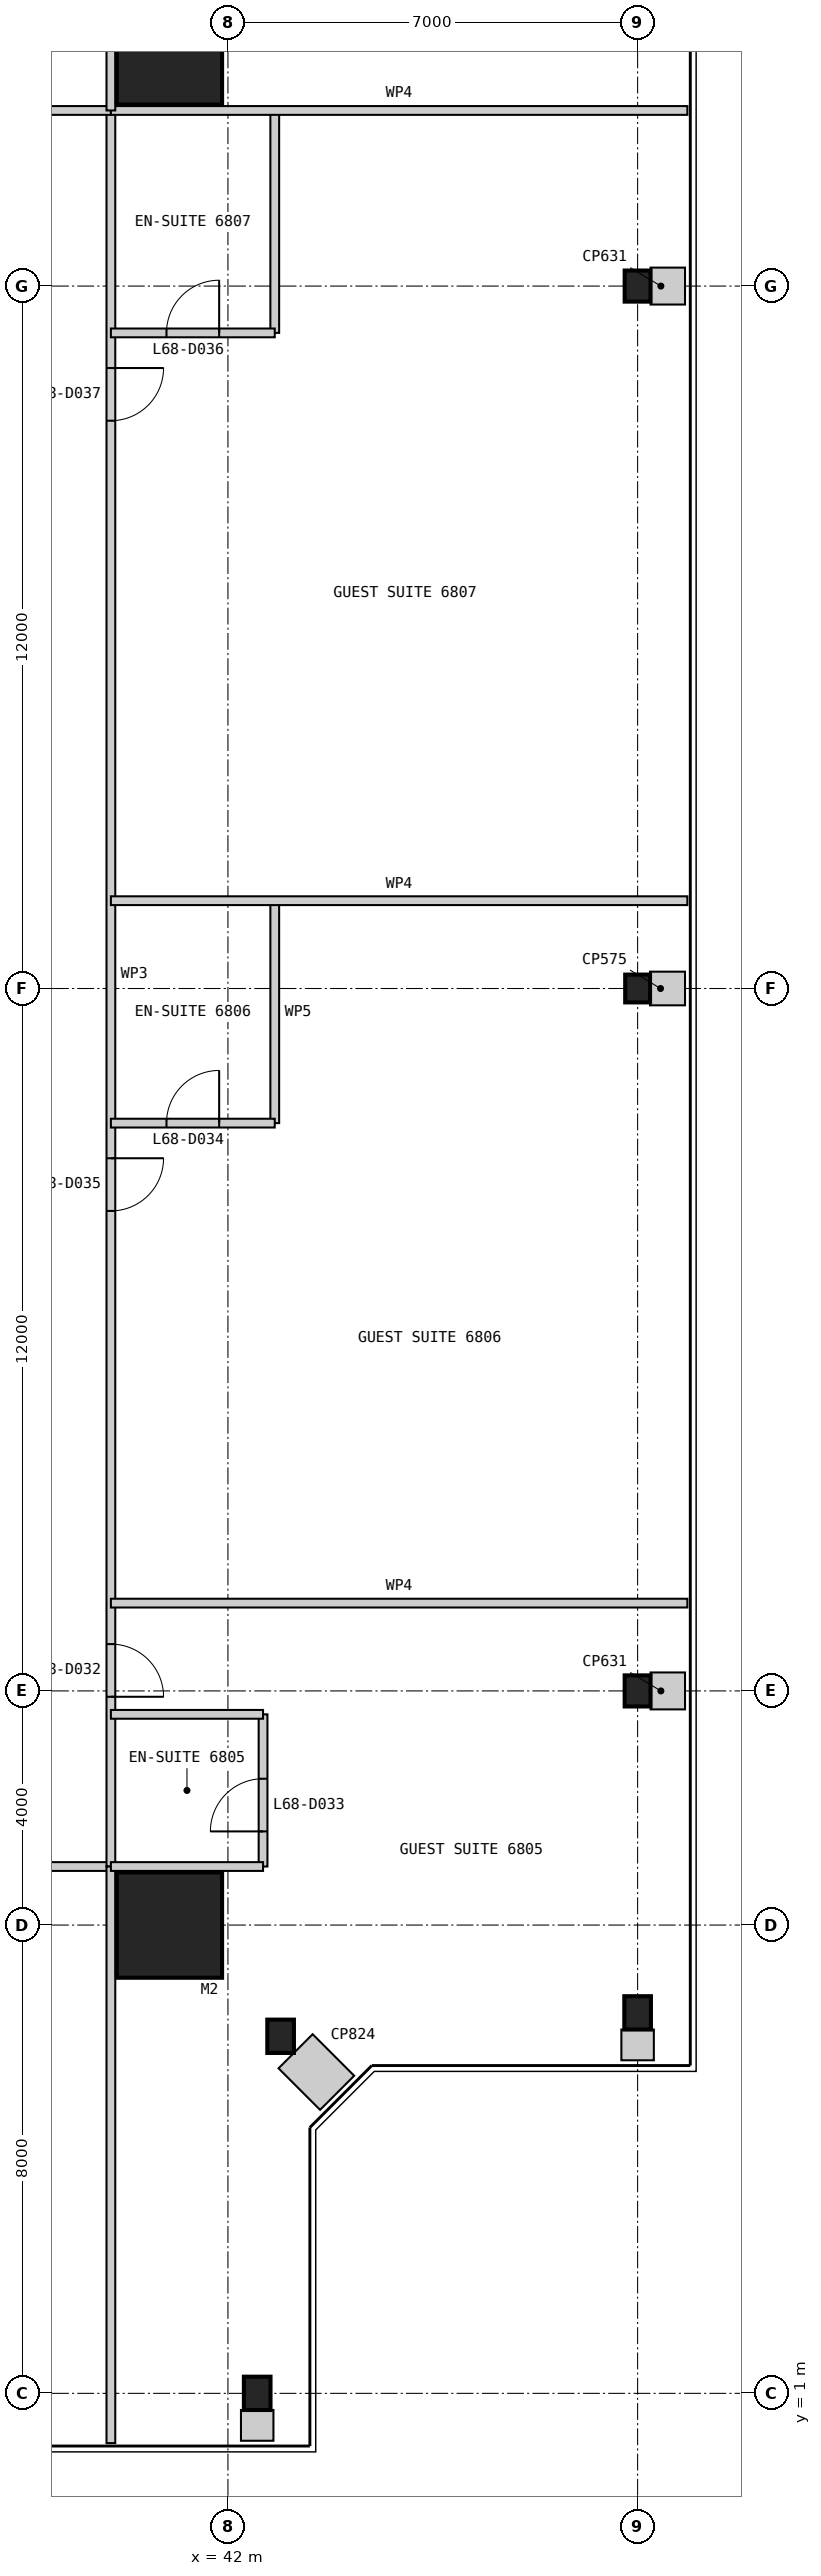
"""IFC4 building model, lengths in metres.
Left out: names, types, materials, properties, quantities, classifications, styles, units other than length and angle.
Written with IfcOpenShell. Run it as: python <this file> out.ifc"""

import sys

from ifc_helpers import new_model, si_unit, direction, frame, frame_2d, origin, origin_2d, place, context, subcontext, project, spatial, rectangle, i_section, extrude, element, fill, save


model = new_model("IFC4")
c1 = context("Model", 3, precision=1e-05, world=origin(), true_north=direction((0.0, 1.0)))
c2 = subcontext(c1, "Body", "Model", "MODEL_VIEW")
j1 = project(units=[si_unit("LENGTHUNIT", "METRE"), si_unit("PLANEANGLEUNIT", "RADIAN")], contexts=[c1])
p1 = place(None, origin())
s1 = spatial("IfcSite", under=j1, at=p1, CompositionType="ELEMENT")
p2 = place(p1, origin())
s2 = spatial("IfcBuilding", under=s1, at=p2, CompositionType="ELEMENT")
p3 = place(p2, frame((0.0, 0.0, 283.2)))
s3 = spatial("IfcBuildingStorey", under=s2, at=p3, CompositionType="ELEMENT", Elevation=283.2)
for number, where, z_axis, x_axis in (
    (1, (41.0, 9.0, 0.0), (0.0, 0.0, 1.0), (1.0, 0.0, 0.0)),
    (2, (41.0, 41.0, 0.0), (0.0, 0.0, 1.0), (1.0, 0.0, 0.0)),
):
    element("IfcColumn", number, at=place(p3, frame(where, z_axis=z_axis, x_axis=x_axis)), inside=s3, PredefinedType="COLUMN", context=c2, shape_type="SweptSolid", body=[
        extrude(rectangle(XDim=1.8, YDim=1.8, at=origin_2d()), origin(), (0.0, 0.0, 1.0), 3.4),
    ])
for number, where, z_axis, x_axis in (
    (3, (42.5, 1.0, 0.0), (0.0, 0.0, 1.0), (1.0, 0.0, 0.0)),
    (4, (42.9, 7.1, 0.0), (0.0, 0.0, 1.0), (1.0, 0.0, 0.0)),
    (5, (49.0, 7.5, 0.0), (0.0, 0.0, 1.0), (1.0, 0.0, 0.0)),
):
    element("IfcColumn", number, at=place(p3, frame(where, z_axis=z_axis, x_axis=x_axis)), inside=s3, PredefinedType="COLUMN", context=c2, shape_type="SweptSolid", body=[
        extrude(i_section(OverallWidth=0.455, OverallDepth=0.569, WebThickness=0.078, FlangeThickness=0.125, at=origin_2d()), origin(), (0.0, 0.0, 1.0), 3.4),
    ])
p4 = place(p3, frame((49.0, 13.0, 0.0), z_axis=(0.0, 0.0, 1.0), x_axis=(1.0, 0.0, 0.0)))
e6 = element("IfcColumn", 6, at=p4, inside=s3, PredefinedType="COLUMN", context=c2, shape_type="SweptSolid", body=[
    extrude(i_section(OverallWidth=0.442, OverallDepth=0.531, WebThickness=0.066, FlangeThickness=0.106, at=origin_2d()), origin(), (0.0, 0.0, 1.0), 3.4),
])
p5 = place(p3, frame((49.0, 25.0, 0.0), z_axis=(0.0, 0.0, 1.0), x_axis=(1.0, 0.0, 0.0)))
e7 = element("IfcColumn", 7, at=p5, inside=s3, PredefinedType="COLUMN", context=c2, shape_type="SweptSolid", body=[
    extrude(i_section(OverallWidth=0.424, OverallDepth=0.475, WebThickness=0.048, FlangeThickness=0.077, at=origin_2d()), origin(), (0.0, 0.0, 1.0), 3.4),
])
p6 = place(p3, frame((49.0, 37.0, 0.0), z_axis=(0.0, 0.0, 1.0), x_axis=(1.0, 0.0, 0.0)))
e8 = element("IfcColumn", 8, at=p6, inside=s3, PredefinedType="COLUMN", context=c2, shape_type="SweptSolid", body=[
    extrude(i_section(OverallWidth=0.442, OverallDepth=0.531, WebThickness=0.066, FlangeThickness=0.106, at=origin_2d()), origin(), (0.0, 0.0, 1.0), 3.4),
])
p7 = place(p3, frame((10.0, 10.0, 0.0), z_axis=(0.0, 0.0, 1.0), x_axis=(1.0, 0.0, 0.0)))
e9 = element("IfcWall", 9, at=p7, inside=s3, PredefinedType="PARTITIONING", context=c2, shape_type="SweptSolid", body=[
    extrude(rectangle(XDim=30.0, YDim=0.15, at=frame_2d((15.0, 0.0))), origin(), (0.0, 0.0, 1.0), 3.25),
])
p8 = place(p7, frame((2.9, 0.0, 0.0)))
e10 = element("IfcOpeningElement", 10, at=p8, cuts=e9, PredefinedType="OPENING", context=c2, shape_type="SweptSolid", body=[
    extrude(rectangle(XDim=0.9, YDim=2.1, at=frame_2d((0.45, 1.05))), frame((0.0, 0.085, 0.0), z_axis=(0.0, -1.0, 0.0), x_axis=(1.0, 0.0, 0.0)), (0.0, 0.0, 1.0), 0.17),
])
p9 = place(p7, frame((11.2, 0.0, 0.0)))
e11 = element("IfcOpeningElement", 11, at=p9, cuts=e9, PredefinedType="OPENING", context=c2, shape_type="SweptSolid", body=[
    extrude(rectangle(XDim=0.9, YDim=2.1, at=frame_2d((0.45, 1.05))), frame((0.0, 0.085, 0.0), z_axis=(0.0, -1.0, 0.0), x_axis=(1.0, 0.0, 0.0)), (0.0, 0.0, 1.0), 0.17),
])
p10 = place(p7, frame((17.6, 0.0, 0.0)))
e12 = element("IfcOpeningElement", 12, at=p10, cuts=e9, PredefinedType="OPENING", context=c2, shape_type="SweptSolid", body=[
    extrude(rectangle(XDim=0.9, YDim=2.1, at=frame_2d((0.45, 1.05))), frame((0.0, 0.085, 0.0), z_axis=(0.0, -1.0, 0.0), x_axis=(1.0, 0.0, 0.0)), (0.0, 0.0, 1.0), 0.17),
])
p11 = place(p7, frame((26.3, 0.0, 0.0)))
e13 = element("IfcOpeningElement", 13, at=p11, cuts=e9, PredefinedType="OPENING", context=c2, shape_type="SweptSolid", body=[
    extrude(rectangle(XDim=1.0, YDim=2.1, at=frame_2d((0.5, 1.05))), frame((0.0, 0.085, 0.0), z_axis=(0.0, -1.0, 0.0), x_axis=(1.0, 0.0, 0.0)), (0.0, 0.0, 1.0), 0.17),
])
p12 = place(p3, frame((40.0, 10.0, 0.0), z_axis=(0.0, 0.0, 1.0), x_axis=(0.0, 1.0, 0.0)))
e14 = element("IfcWall", 14, at=p12, inside=s3, PredefinedType="PARTITIONING", context=c2, shape_type="SweptSolid", body=[
    extrude(rectangle(XDim=30.0, YDim=0.15, at=frame_2d((15.0, 0.0))), origin(), (0.0, 0.0, 1.0), 2.638),
])
p13 = place(p12, frame((2.9, 0.0, 0.0)))
e15 = element("IfcOpeningElement", 15, at=p13, cuts=e14, PredefinedType="OPENING", context=c2, shape_type="SweptSolid", body=[
    extrude(rectangle(XDim=0.9, YDim=2.1, at=frame_2d((0.45, 1.05))), frame((0.0, 0.085, 0.0), z_axis=(0.0, -1.0, 0.0), x_axis=(1.0, 0.0, 0.0)), (0.0, 0.0, 1.0), 0.17),
])
p14 = place(p12, frame((11.2, 0.0, 0.0)))
e16 = element("IfcOpeningElement", 16, at=p14, cuts=e14, PredefinedType="OPENING", context=c2, shape_type="SweptSolid", body=[
    extrude(rectangle(XDim=0.9, YDim=2.1, at=frame_2d((0.45, 1.05))), frame((0.0, 0.085, 0.0), z_axis=(0.0, -1.0, 0.0), x_axis=(1.0, 0.0, 0.0)), (0.0, 0.0, 1.0), 0.17),
])
p15 = place(p12, frame((24.7, 0.0, 0.0)))
e17 = element("IfcOpeningElement", 17, at=p15, cuts=e14, PredefinedType="OPENING", context=c2, shape_type="SweptSolid", body=[
    extrude(rectangle(XDim=0.9, YDim=2.1, at=frame_2d((0.45, 1.05))), frame((0.0, 0.085, 0.0), z_axis=(0.0, -1.0, 0.0), x_axis=(1.0, 0.0, 0.0)), (0.0, 0.0, 1.0), 0.17),
])
p16 = place(p3, frame((40.0, 0.15, 0.0), z_axis=(0.0, 0.0, 1.0), x_axis=(0.0, 1.0, 0.0)))
e18 = element("IfcWall", 18, at=p16, inside=s3, PredefinedType="PARTITIONING", context=c2, shape_type="SweptSolid", body=[
    extrude(rectangle(XDim=9.85, YDim=0.15, at=frame_2d((4.925, 0.0))), origin(), (0.0, 0.0, 1.0), 3.25),
])
p17 = place(p3, frame((42.6, 10.0, 0.0), z_axis=(0.0, 0.0, 1.0), x_axis=(0.0, 1.0, 0.0)))
e19 = element("IfcWall", 19, at=p17, inside=s3, PredefinedType="PARTITIONING", context=c2, shape_type="SweptSolid", body=[
    extrude(rectangle(XDim=2.6, YDim=0.15, at=frame_2d((1.3, 0.0))), origin(), (0.0, 0.0, 1.0), 3.25),
])
p18 = place(p17, frame((0.6, 0.0, 0.0)))
e20 = element("IfcOpeningElement", 20, at=p18, cuts=e19, PredefinedType="OPENING", context=c2, shape_type="SweptSolid", body=[
    extrude(rectangle(XDim=0.9, YDim=2.1, at=frame_2d((0.45, 1.05))), frame((0.0, 0.085, 0.0), z_axis=(0.0, -1.0, 0.0), x_axis=(1.0, 0.0, 0.0)), (0.0, 0.0, 1.0), 0.17),
])
for number, where, z_axis, x_axis in (
    (21, (42.6, 10.0, 0.0), (0.0, 0.0, 1.0), (-1.0, 0.0, 0.0)),
    (22, (42.6, 12.6, 0.0), (0.0, 0.0, 1.0), (-1.0, 0.0, 0.0)),
):
    element("IfcWall", number, at=place(p3, frame(where, z_axis=z_axis, x_axis=x_axis)), inside=s3, PredefinedType="PARTITIONING", context=c2, shape_type="SweptSolid", body=[
        extrude(rectangle(XDim=2.6, YDim=0.15, at=frame_2d((1.3, 0.0))), origin(), (0.0, 0.0, 1.0), 3.25),
    ])
p19 = place(p3, frame((49.85, 14.5, 0.0), z_axis=(0.0, 0.0, 1.0), x_axis=(-1.0, 0.0, 0.0)))
e23 = element("IfcWall", 23, at=p19, inside=s3, PredefinedType="PARTITIONING", context=c2, shape_type="SweptSolid", body=[
    extrude(rectangle(XDim=9.85, YDim=0.15, at=frame_2d((4.925, 0.0))), origin(), (0.0, 0.0, 1.0), 3.25),
])
p20 = place(p3, frame((42.8, 22.7, 0.0), z_axis=(0.0, 0.0, 1.0), x_axis=(0.0, 1.0, 0.0)))
e24 = element("IfcWall", 24, at=p20, inside=s3, PredefinedType="PARTITIONING", context=c2, shape_type="SweptSolid", body=[
    extrude(rectangle(XDim=3.8, YDim=0.15, at=frame_2d((1.9, 0.0))), origin(), (0.0, 0.0, 1.0), 3.25),
])
p21 = place(p3, frame((42.8, 22.7, 0.0), z_axis=(0.0, 0.0, 1.0), x_axis=(-1.0, 0.0, 0.0)))
e25 = element("IfcWall", 25, at=p21, inside=s3, PredefinedType="PARTITIONING", context=c2, shape_type="SweptSolid", body=[
    extrude(rectangle(XDim=2.8, YDim=0.15, at=frame_2d((1.4, 0.0))), origin(), (0.0, 0.0, 1.0), 3.25),
])
p22 = place(p21, frame((0.95, 0.0, 0.0)))
e26 = element("IfcOpeningElement", 26, at=p22, cuts=e25, PredefinedType="OPENING", context=c2, shape_type="SweptSolid", body=[
    extrude(rectangle(XDim=0.9, YDim=2.1, at=frame_2d((0.45, 1.05))), frame((0.0, 0.085, 0.0), z_axis=(0.0, -1.0, 0.0), x_axis=(1.0, 0.0, 0.0)), (0.0, 0.0, 1.0), 0.17),
])
p23 = place(p3, frame((49.85, 26.5, 0.0), z_axis=(0.0, 0.0, 1.0), x_axis=(-1.0, 0.0, 0.0)))
e27 = element("IfcWall", 27, at=p23, inside=s3, PredefinedType="PARTITIONING", context=c2, shape_type="SweptSolid", body=[
    extrude(rectangle(XDim=9.85, YDim=0.15, at=frame_2d((4.925, 0.0))), origin(), (0.0, 0.0, 1.0), 3.25),
])
p24 = place(p3, frame((42.8, 36.2, 0.0), z_axis=(0.0, 0.0, 1.0), x_axis=(0.0, 1.0, 0.0)))
e28 = element("IfcWall", 28, at=p24, inside=s3, PredefinedType="PARTITIONING", context=c2, shape_type="SweptSolid", body=[
    extrude(rectangle(XDim=3.8, YDim=0.15, at=frame_2d((1.9, 0.0))), origin(), (0.0, 0.0, 1.0), 3.25),
])
p25 = place(p3, frame((42.8, 36.2, 0.0), z_axis=(0.0, 0.0, 1.0), x_axis=(-1.0, 0.0, 0.0)))
e29 = element("IfcWall", 29, at=p25, inside=s3, PredefinedType="PARTITIONING", context=c2, shape_type="SweptSolid", body=[
    extrude(rectangle(XDim=2.8, YDim=0.15, at=frame_2d((1.4, 0.0))), origin(), (0.0, 0.0, 1.0), 3.25),
])
p26 = place(p25, frame((0.95, 0.0, 0.0)))
e30 = element("IfcOpeningElement", 30, at=p26, cuts=e29, PredefinedType="OPENING", context=c2, shape_type="SweptSolid", body=[
    extrude(rectangle(XDim=0.9, YDim=2.1, at=frame_2d((0.45, 1.05))), frame((0.0, 0.085, 0.0), z_axis=(0.0, -1.0, 0.0), x_axis=(1.0, 0.0, 0.0)), (0.0, 0.0, 1.0), 0.17),
])
p27 = place(p3, frame((40.0, 40.0, 0.0), z_axis=(0.0, 0.0, 1.0), x_axis=(-1.0, 0.0, 0.0)))
e31 = element("IfcWall", 31, at=p27, inside=s3, PredefinedType="PARTITIONING", context=c2, shape_type="SweptSolid", body=[
    extrude(rectangle(XDim=30.0, YDim=0.15, at=frame_2d((15.0, 0.0))), origin(), (0.0, 0.0, 1.0), 3.25),
])
p28 = place(p27, frame((2.9, 0.0, 0.0)))
e32 = element("IfcOpeningElement", 32, at=p28, cuts=e31, PredefinedType="OPENING", context=c2, shape_type="SweptSolid", body=[
    extrude(rectangle(XDim=0.9, YDim=2.1, at=frame_2d((0.45, 1.05))), frame((0.0, 0.085, 0.0), z_axis=(0.0, -1.0, 0.0), x_axis=(1.0, 0.0, 0.0)), (0.0, 0.0, 1.0), 0.17),
])
p29 = place(p27, frame((11.2, 0.0, 0.0)))
e33 = element("IfcOpeningElement", 33, at=p29, cuts=e31, PredefinedType="OPENING", context=c2, shape_type="SweptSolid", body=[
    extrude(rectangle(XDim=0.9, YDim=2.1, at=frame_2d((0.45, 1.05))), frame((0.0, 0.085, 0.0), z_axis=(0.0, -1.0, 0.0), x_axis=(1.0, 0.0, 0.0)), (0.0, 0.0, 1.0), 0.17),
])
p30 = place(p27, frame((24.7, 0.0, 0.0)))
e34 = element("IfcOpeningElement", 34, at=p30, cuts=e31, PredefinedType="OPENING", context=c2, shape_type="SweptSolid", body=[
    extrude(rectangle(XDim=0.9, YDim=2.1, at=frame_2d((0.45, 1.05))), frame((0.0, 0.085, 0.0), z_axis=(0.0, -1.0, 0.0), x_axis=(1.0, 0.0, 0.0)), (0.0, 0.0, 1.0), 0.17),
])
p31 = place(p3, frame((49.85, 40.0, 0.0), z_axis=(0.0, 0.0, 1.0), x_axis=(-1.0, 0.0, 0.0)))
e35 = element("IfcWall", 35, at=p31, inside=s3, PredefinedType="PARTITIONING", context=c2, shape_type="SweptSolid", body=[
    extrude(rectangle(XDim=9.85, YDim=0.15, at=frame_2d((4.925, 0.0))), origin(), (0.0, 0.0, 1.0), 3.25),
])
p32 = place(p3, frame((40.0, 42.6, 0.0), z_axis=(0.0, 0.0, 1.0), x_axis=(0.0, -1.0, 0.0)))
e36 = element("IfcWall", 36, at=p32, inside=s3, PredefinedType="PARTITIONING", context=c2, shape_type="SweptSolid", body=[
    extrude(rectangle(XDim=2.6, YDim=0.15, at=frame_2d((1.3, 0.0))), origin(), (0.0, 0.0, 1.0), 3.25),
])
p33 = place(p3, frame((42.5, 0.19, 0.0), z_axis=(0.0, 0.0, 1.0), x_axis=(0.0, 1.0, 0.0)))
e37 = element("IfcWall", 37, at=p33, inside=s3, PredefinedType="PARTITIONING", context=c2, shape_type="SweptSolid", body=[
    extrude(rectangle(XDim=0.526, YDim=0.555, at=frame_2d((0.263, 0.0))), origin(), (0.0, 0.0, 1.0), 3.25),
])
p34 = place(p3, frame((43.866, 6.134, 0.0), z_axis=(0.0, 0.0, 1.0), x_axis=(-0.707106781187, 0.707106781187, 0.0)))
e38 = element("IfcWall", 38, at=p34, inside=s3, PredefinedType="PARTITIONING", context=c2, shape_type="SweptSolid", body=[
    extrude(rectangle(XDim=1.004, YDim=0.824, at=frame_2d((0.502, 0.0))), origin(), (0.0, 0.0, 1.0), 3.25),
])
p35 = place(p3, frame((49.0, 6.69, 0.0), z_axis=(0.0, 0.0, 1.0), x_axis=(0.0, 1.0, 0.0)))
e39 = element("IfcWall", 39, at=p35, inside=s3, PredefinedType="PARTITIONING", context=c2, shape_type="SweptSolid", body=[
    extrude(rectangle(XDim=0.526, YDim=0.555, at=frame_2d((0.263, 0.0))), origin(), (0.0, 0.0, 1.0), 3.25),
])
p36 = place(p3, frame((49.81, 13.0, 0.0), z_axis=(0.0, 0.0, 1.0), x_axis=(-1.0, 0.0, 0.0)))
e40 = element("IfcWall", 40, at=p36, inside=s3, PredefinedType="PARTITIONING", context=c2, shape_type="SweptSolid", body=[
    extrude(rectangle(XDim=0.589, YDim=0.631, at=frame_2d((0.294, 0.0))), origin(), (0.0, 0.0, 1.0), 3.25),
])
p37 = place(p3, frame((49.81, 25.0, 0.0), z_axis=(0.0, 0.0, 1.0), x_axis=(-1.0, 0.0, 0.0)))
e41 = element("IfcWall", 41, at=p37, inside=s3, PredefinedType="PARTITIONING", context=c2, shape_type="SweptSolid", body=[
    extrude(rectangle(XDim=0.598, YDim=0.575, at=frame_2d((0.299, 0.0))), origin(), (0.0, 0.0, 1.0), 3.25),
])
p38 = place(p3, frame((49.81, 37.0, 0.0), z_axis=(0.0, 0.0, 1.0), x_axis=(-1.0, 0.0, 0.0)))
e42 = element("IfcWall", 42, at=p38, inside=s3, PredefinedType="PARTITIONING", context=c2, shape_type="SweptSolid", body=[
    extrude(rectangle(XDim=0.589, YDim=0.631, at=frame_2d((0.294, 0.0))), origin(), (0.0, 0.0, 1.0), 3.25),
])
p39 = place(p13, frame((0.9, 0.0, 0.0), z_axis=(0.0, 0.0, 1.0), x_axis=(-1.0, 0.0, 0.0)))
e43 = element("IfcDoor", 43, at=p39, inside=s3, OperationType="SINGLE_SWING_RIGHT", PredefinedType="DOOR", context=c2, shape_type="SweptSolid", body=[
    extrude(rectangle(XDim=0.9, YDim=2.1, at=frame_2d((0.45, 1.05))), frame((0.0, 0.025, 0.0), z_axis=(0.0, -1.0, 0.0), x_axis=(1.0, 0.0, 0.0)), (0.0, 0.0, 1.0), 0.05),
])
fill(e15, e43)
p40 = place(p18, origin())
e44 = element("IfcDoor", 44, at=p40, inside=s3, OperationType="SINGLE_SWING_LEFT", PredefinedType="DOOR", context=c2, shape_type="SweptSolid", body=[
    extrude(rectangle(XDim=0.9, YDim=2.1, at=frame_2d((0.45, 1.05))), frame((0.0, 0.025, 0.0), z_axis=(0.0, -1.0, 0.0), x_axis=(1.0, 0.0, 0.0)), (0.0, 0.0, 1.0), 0.05),
])
fill(e20, e44)
p41 = place(p22, frame((0.9, 0.0, 0.0), z_axis=(0.0, 0.0, 1.0), x_axis=(-1.0, 0.0, 0.0)))
e45 = element("IfcDoor", 45, at=p41, inside=s3, OperationType="SINGLE_SWING_RIGHT", PredefinedType="DOOR", context=c2, shape_type="SweptSolid", body=[
    extrude(rectangle(XDim=0.9, YDim=2.1, at=frame_2d((0.45, 1.05))), frame((0.0, 0.025, 0.0), z_axis=(0.0, -1.0, 0.0), x_axis=(1.0, 0.0, 0.0)), (0.0, 0.0, 1.0), 0.05),
])
fill(e26, e45)
p42 = place(p14, frame((0.9, 0.0, 0.0), z_axis=(0.0, 0.0, 1.0), x_axis=(-1.0, 0.0, 0.0)))
e46 = element("IfcDoor", 46, at=p42, inside=s3, OperationType="SINGLE_SWING_LEFT", PredefinedType="DOOR", context=c2, shape_type="SweptSolid", body=[
    extrude(rectangle(XDim=0.9, YDim=2.1, at=frame_2d((0.45, 1.05))), frame((0.0, 0.025, 0.0), z_axis=(0.0, -1.0, 0.0), x_axis=(1.0, 0.0, 0.0)), (0.0, 0.0, 1.0), 0.05),
])
fill(e16, e46)
p43 = place(p26, frame((0.9, 0.0, 0.0), z_axis=(0.0, 0.0, 1.0), x_axis=(-1.0, 0.0, 0.0)))
e47 = element("IfcDoor", 47, at=p43, inside=s3, OperationType="SINGLE_SWING_RIGHT", PredefinedType="DOOR", context=c2, shape_type="SweptSolid", body=[
    extrude(rectangle(XDim=0.9, YDim=2.1, at=frame_2d((0.45, 1.05))), frame((0.0, 0.025, 0.0), z_axis=(0.0, -1.0, 0.0), x_axis=(1.0, 0.0, 0.0)), (0.0, 0.0, 1.0), 0.05),
])
fill(e30, e47)
p44 = place(p15, frame((0.9, 0.0, 0.0), z_axis=(0.0, 0.0, 1.0), x_axis=(-1.0, 0.0, 0.0)))
e48 = element("IfcDoor", 48, at=p44, inside=s3, OperationType="SINGLE_SWING_LEFT", PredefinedType="DOOR", context=c2, shape_type="SweptSolid", body=[
    extrude(rectangle(XDim=0.9, YDim=2.1, at=frame_2d((0.45, 1.05))), frame((0.0, 0.025, 0.0), z_axis=(0.0, -1.0, 0.0), x_axis=(1.0, 0.0, 0.0)), (0.0, 0.0, 1.0), 0.05),
])
fill(e17, e48)
save(model, sys.argv[1])
